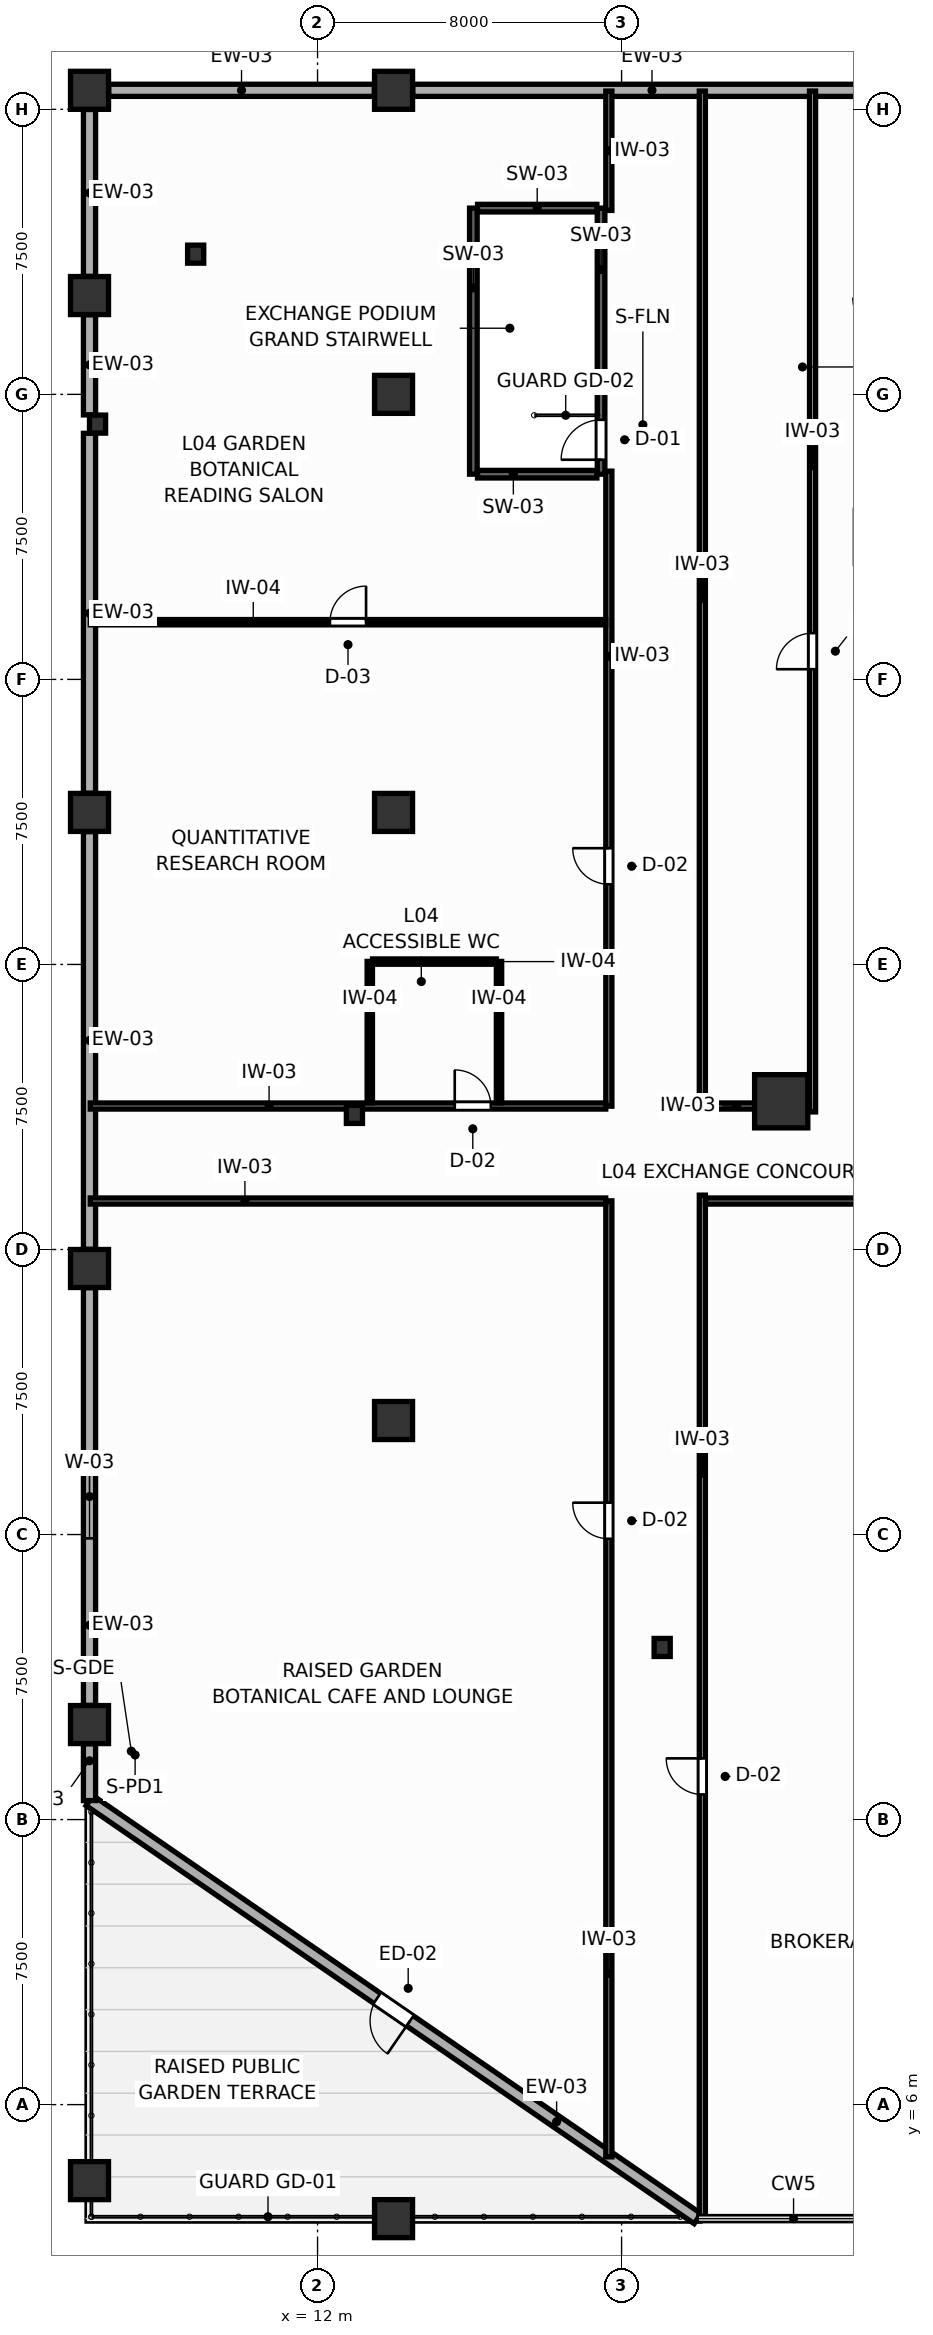
"""IFC4 building model, lengths in metres.
Left out: names, types, materials, properties, quantities, classifications, styles, units other than length and angle.
Written with IfcOpenShell. Run it as: python <this file> out.ifc"""

import sys

from ifc_helpers import new_model, si_unit, direction, frame, frame_2d, origin, origin_2d, place, context, subcontext, project, spatial, rectangle, i_section, extrude, source, transform, mapped, element, fill, save


model = new_model("IFC4")
c1 = context("Model", 3, precision=1e-05, world=origin(), true_north=direction((0.0, 1.0)))
c2 = subcontext(c1, "Body", "Model", "MODEL_VIEW")
j1 = project(units=[si_unit("LENGTHUNIT", "METRE"), si_unit("PLANEANGLEUNIT", "RADIAN")], contexts=[c1])
p1 = place(None, origin())
s1 = spatial("IfcSite", under=j1, at=p1, CompositionType="ELEMENT")
p2 = place(p1, origin())
s2 = spatial("IfcBuilding", under=s1, at=p2, CompositionType="ELEMENT")
p3 = place(p2, frame((0.0, 0.0, 19.2)))
s3 = spatial("IfcBuildingStorey", under=s2, at=p3, CompositionType="ELEMENT", Elevation=19.2)
m1 = source(origin(), c2, "Body", "SweptSolid", [
    extrude(rectangle(XDim=1.4, YDim=1.4, at=origin_2d()), origin(), (0.0, 0.0, 1.0), 4.8),
])
p4 = place(p3, frame((24.2, 32.4, 0.0), z_axis=(0.0, 0.0, 1.0), x_axis=(1.0, 0.0, 0.0)))
e1 = element("IfcColumn", 1, at=p4, inside=s3, PredefinedType="COLUMN", context=c2, shape_type="MappedRepresentation", body=[
    mapped(m1, transform((0.0, 0.0, 0.0), scale=1.0)),
])
m2 = source(origin(), c2, "Body", "SweptSolid", [
    extrude(rectangle(XDim=1.0, YDim=1.0, at=origin_2d()), origin(), (0.0, 0.0, 1.0), 4.8),
])
for number, where, z_axis, x_axis in (
    (2, (6.0, 4.0, 0.0), (0.0, 0.0, 1.0), (1.0, 0.0, 0.0)),
    (3, (6.0, 16.0, 0.0), (0.0, 0.0, 1.0), (1.0, 0.0, 0.0)),
    (4, (6.0, 28.0, 0.0), (0.0, 0.0, 1.0), (1.0, 0.0, 0.0)),
    (5, (6.0, 40.0, 0.0), (0.0, 0.0, 1.0), (1.0, 0.0, 0.0)),
    (6, (6.0, 53.6, 0.0), (0.0, 0.0, 1.0), (1.0, 0.0, 0.0)),
    (7, (6.0, 59.0, 0.0), (0.0, 0.0, 1.0), (1.0, 0.0, 0.0)),
    (8, (14.0, 3.0, 0.0), (0.0, 0.0, 1.0), (1.0, 0.0, 0.0)),
    (9, (14.0, 59.0, 0.0), (0.0, 0.0, 1.0), (1.0, 0.0, 0.0)),
    (10, (14.0, 24.0, 0.0), (0.0, 0.0, 1.0), (1.0, 0.0, 0.0)),
    (11, (14.0, 40.0, 0.0), (0.0, 0.0, 1.0), (1.0, 0.0, 0.0)),
    (12, (14.0, 51.0, 0.0), (0.0, 0.0, 1.0), (1.0, 0.0, 0.0)),
):
    element("IfcColumn", number, at=place(p3, frame(where, z_axis=z_axis, x_axis=x_axis)), inside=s3, PredefinedType="COLUMN", context=c2, shape_type="MappedRepresentation", body=[
        mapped(m2, transform((0.0, 0.0, 0.0), scale=1.0)),
    ])
m3 = source(origin(), c2, "Body", "SweptSolid", [
    extrude(i_section(OverallWidth=0.424, OverallDepth=0.474, WebThickness=0.045, FlangeThickness=0.072, FilletRadius=0.015, at=origin_2d()), origin(), (0.0, 0.0, 1.0), 4.8),
])
for number, where, z_axis, x_axis in (
    (13, (8.793, 54.689, 0.0), (0.0, 0.0, 1.0), (1.0, 0.0, 0.0)),
    (14, (6.211, 50.217, 0.0), (0.0, 0.0, 1.0), (1.0, 0.0, 0.0)),
    (15, (12.97, 32.054, 0.0), (0.0, 0.0, 1.0), (1.0, 0.0, 0.0)),
    (16, (21.068, 18.029, 0.0), (0.0, 0.0, 1.0), (1.0, 0.0, 0.0)),
):
    element("IfcColumn", number, at=place(p3, frame(where, z_axis=z_axis, x_axis=x_axis)), inside=s3, PredefinedType="COLUMN", context=c2, shape_type="MappedRepresentation", body=[
        mapped(m3, transform((0.0, 0.0, 0.0), scale=1.0)),
    ])
p5 = place(p3, frame((6.0, 14.0, 0.0), z_axis=(0.0, 0.0, 1.0), x_axis=(0.824041924199, -0.566528822887, 0.0)))
e17 = element("IfcWall", 17, at=p5, inside=s3, PredefinedType="SOLIDWALL", context=c2, shape_type="SweptSolid", body=[
    extrude(rectangle(XDim=19.417, YDim=0.32, at=frame_2d((9.708, 0.0))), origin(), (0.0, 0.0, 1.0), 4.58),
])
p6 = place(p5, frame((9.183, 0.0, 0.0)))
e18 = element("IfcOpeningElement", 18, at=p6, cuts=e17, PredefinedType="OPENING", context=c2, shape_type="SweptSolid", body=[
    extrude(rectangle(XDim=1.05, YDim=2.1, at=frame_2d((0.525, 1.05))), frame((0.0, 0.17, 0.0), z_axis=(0.0, -1.0, 0.0), x_axis=(1.0, 0.0, 0.0)), (0.0, 0.0, 1.0), 0.34),
])
p7 = place(p3, frame((27.095, 59.0, 0.0), z_axis=(0.0, 0.0, 1.0), x_axis=(-1.0, 0.0, 0.0)))
e19 = element("IfcWall", 19, at=p7, inside=s3, PredefinedType="SOLIDWALL", context=c2, shape_type="SweptSolid", body=[
    extrude(rectangle(XDim=12.59, YDim=0.32, at=frame_2d((6.295, 0.0))), origin(), (0.0, 0.0, 1.0), 3.88),
])
p8 = place(p3, frame((13.495, 59.0, 0.0), z_axis=(0.0, 0.0, 1.0), x_axis=(-1.0, 0.0, 0.0)))
e20 = element("IfcWall", 20, at=p8, inside=s3, PredefinedType="SOLIDWALL", context=c2, shape_type="SweptSolid", body=[
    extrude(rectangle(XDim=6.99, YDim=0.32, at=frame_2d((3.495, 0.0))), origin(), (0.0, 0.0, 1.0), 3.88),
])
p9 = place(p3, frame((6.0, 58.495, 0.0), z_axis=(0.0, 0.0, 1.0), x_axis=(0.0, -1.0, 0.0)))
e21 = element("IfcWall", 21, at=p9, inside=s3, PredefinedType="SOLIDWALL", context=c2, shape_type="SweptSolid", body=[
    extrude(rectangle(XDim=4.39, YDim=0.32, at=frame_2d((2.195, 0.0))), origin(), (0.0, 0.0, 1.0), 3.88),
])
p10 = place(p3, frame((6.0, 53.095, 0.0), z_axis=(0.0, 0.0, 1.0), x_axis=(0.0, -1.0, 0.0)))
e22 = element("IfcWall", 22, at=p10, inside=s3, PredefinedType="SOLIDWALL", context=c2, shape_type="SweptSolid", body=[
    extrude(rectangle(XDim=2.636, YDim=0.32, at=frame_2d((1.318, 0.0))), origin(), (0.0, 0.0, 1.0), 3.88),
])
p11 = place(p3, frame((6.0, 49.975, 0.0), z_axis=(0.0, 0.0, 1.0), x_axis=(0.0, -1.0, 0.0)))
e23 = element("IfcWall", 23, at=p11, inside=s3, PredefinedType="SOLIDWALL", context=c2, shape_type="SweptSolid", body=[
    extrude(rectangle(XDim=9.47, YDim=0.32, at=frame_2d((4.735, 0.0))), origin(), (0.0, 0.0, 1.0), 3.88),
])
p12 = place(p3, frame((6.0, 39.495, 0.0), z_axis=(0.0, 0.0, 1.0), x_axis=(0.0, -1.0, 0.0)))
e24 = element("IfcWall", 24, at=p12, inside=s3, PredefinedType="SOLIDWALL", context=c2, shape_type="SweptSolid", body=[
    extrude(rectangle(XDim=10.99, YDim=0.32, at=frame_2d((5.495, 0.0))), origin(), (0.0, 0.0, 1.0), 3.88),
])
p13 = place(p3, frame((6.0, 27.495, 0.0), z_axis=(0.0, 0.0, 1.0), x_axis=(0.0, -1.0, 0.0)))
e25 = element("IfcWall", 25, at=p13, inside=s3, PredefinedType="SOLIDWALL", context=c2, shape_type="SweptSolid", body=[
    extrude(rectangle(XDim=10.99, YDim=0.32, at=frame_2d((5.495, 0.0))), origin(), (0.0, 0.0, 1.0), 3.88),
])
p14 = place(p13, frame((4.395, 0.0, 0.75)))
e26 = element("IfcOpeningElement", 26, at=p14, cuts=e25, PredefinedType="OPENING", context=c2, shape_type="SweptSolid", body=[
    extrude(rectangle(XDim=2.2, YDim=2.0, at=frame_2d((1.1, 1.0))), frame((0.0, 0.17, 0.0), z_axis=(0.0, -1.0, 0.0), x_axis=(1.0, 0.0, 0.0)), (0.0, 0.0, 1.0), 0.34),
])
p15 = place(p3, frame((6.0, 15.495, 0.0), z_axis=(0.0, 0.0, 1.0), x_axis=(0.0, -1.0, 0.0)))
e27 = element("IfcWall", 27, at=p15, inside=s3, PredefinedType="SOLIDWALL", context=c2, shape_type="SweptSolid", body=[
    extrude(rectangle(XDim=1.495, YDim=0.32, at=frame_2d((0.748, 0.0))), origin(), (0.0, 0.0, 1.0), 3.88),
])
p16 = place(p3, frame((19.46, 48.9, 0.0), z_axis=(0.0, 0.0, 1.0), x_axis=(0.0, 1.0, 0.0)))
e28 = element("IfcWall", 28, at=p16, inside=s3, PredefinedType="SHEAR", context=c2, shape_type="SweptSolid", body=[
    extrude(rectangle(XDim=7.0, YDim=0.2, at=frame_2d((3.5, 0.0))), origin(), (0.0, 0.0, 1.0), 4.8),
])
p17 = place(p16, frame((0.38, 0.0, 0.0)))
e29 = element("IfcOpeningElement", 29, at=p17, cuts=e28, PredefinedType="OPENING", context=c2, shape_type="SweptSolid", body=[
    extrude(rectangle(XDim=1.05, YDim=2.1, at=frame_2d((0.525, 1.05))), frame((0.0, 0.11, 0.0), z_axis=(0.0, -1.0, 0.0), x_axis=(1.0, 0.0, 0.0)), (0.0, 0.0, 1.0), 0.22),
])
p18 = place(p3, frame((16.1, 48.9, 0.0), z_axis=(0.0, 0.0, 1.0), x_axis=(0.0, 1.0, 0.0)))
e30 = element("IfcWall", 30, at=p18, inside=s3, PredefinedType="SHEAR", context=c2, shape_type="SweptSolid", body=[
    extrude(rectangle(XDim=7.0, YDim=0.2, at=frame_2d((3.5, 0.0))), origin(), (0.0, 0.0, 1.0), 4.8),
])
for number, where, z_axis, x_axis in (
    (31, (16.21, 55.9, 0.0), (0.0, 0.0, 1.0), (1.0, 0.0, 0.0)),
    (32, (16.21, 48.9, 0.0), (0.0, 0.0, 1.0), (1.0, 0.0, 0.0)),
):
    element("IfcWall", number, at=place(p3, frame(where, z_axis=z_axis, x_axis=x_axis)), inside=s3, PredefinedType="SHEAR", context=c2, shape_type="SweptSolid", body=[
        extrude(rectangle(XDim=3.14, YDim=0.2, at=frame_2d((1.57, 0.0))), origin(), (0.0, 0.0, 1.0), 4.8),
    ])
p19 = place(p3, frame((22.125, 3.02, 0.0), z_axis=(0.0, 0.0, 1.0), x_axis=(9.072517e-06, 0.999999999959, 0.0)))
e33 = element("IfcWall", 33, at=p19, inside=s3, PredefinedType="PARTITIONING", context=c2, shape_type="SweptSolid", body=[
    extrude(rectangle(XDim=26.91, YDim=0.16, at=frame_2d((13.455, 0.0))), origin(), (0.0, 0.0, 1.0), 4.58),
])
p20 = place(p19, frame((11.14, 0.0, 0.0)))
e34 = element("IfcOpeningElement", 34, at=p20, cuts=e33, PredefinedType="OPENING", context=c2, shape_type="SweptSolid", body=[
    extrude(rectangle(XDim=0.95, YDim=2.05, at=frame_2d((0.475, 1.025))), frame((0.0, 0.09, 0.0), z_axis=(0.0, -1.0, 0.0), x_axis=(1.0, 0.0, 0.0)), (0.0, 0.0, 1.0), 0.18),
])
p21 = place(p3, frame((25.025, 32.12, 0.0), z_axis=(0.0, 0.0, 1.0), x_axis=(0.0, 1.0, 0.0)))
e35 = element("IfcWall", 35, at=p21, inside=s3, PredefinedType="PARTITIONING", context=c2, shape_type="SweptSolid", body=[
    extrude(rectangle(XDim=26.86, YDim=0.16, at=frame_2d((13.43, 0.0))), origin(), (0.0, 0.0, 1.0), 4.58),
])
p22 = place(p21, frame((11.648, 0.0, 0.0)))
e36 = element("IfcOpeningElement", 36, at=p22, cuts=e35, PredefinedType="OPENING", context=c2, shape_type="SweptSolid", body=[
    extrude(rectangle(XDim=0.95, YDim=2.05, at=frame_2d((0.475, 1.025))), frame((0.0, 0.09, 0.0), z_axis=(0.0, -1.0, 0.0), x_axis=(1.0, 0.0, 0.0)), (0.0, 0.0, 1.0), 0.18),
])
p23 = place(p3, frame((22.125, 32.27, 0.0), z_axis=(0.0, 0.0, 1.0), x_axis=(0.0, 1.0, 0.0)))
e37 = element("IfcWall", 37, at=p23, inside=s3, PredefinedType="PARTITIONING", context=c2, shape_type="SweptSolid", body=[
    extrude(rectangle(XDim=26.71, YDim=0.16, at=frame_2d((13.355, 0.0))), origin(), (0.0, 0.0, 1.0), 4.58),
])
p24 = place(p3, frame((19.665, 4.625, 0.0), z_axis=(0.0, 0.0, 1.0), x_axis=(0.0, 1.0, 0.0)))
e38 = element("IfcWall", 38, at=p24, inside=s3, PredefinedType="PARTITIONING", context=c2, shape_type="SweptSolid", body=[
    extrude(rectangle(XDim=25.155, YDim=0.16, at=frame_2d((12.577, 0.0))), origin(), (0.0, 0.0, 1.0), 4.58),
])
p25 = place(p24, frame((16.263, 0.0, 0.0)))
e39 = element("IfcOpeningElement", 39, at=p25, cuts=e38, PredefinedType="OPENING", context=c2, shape_type="SweptSolid", body=[
    extrude(rectangle(XDim=0.95, YDim=2.05, at=frame_2d((0.475, 1.025))), frame((0.0, 0.09, 0.0), z_axis=(0.0, -1.0, 0.0), x_axis=(1.0, 0.0, 0.0)), (0.0, 0.0, 1.0), 0.18),
])
p26 = place(p3, frame((19.665, 32.27, 0.0), z_axis=(0.0, 0.0, 1.0), x_axis=(0.0, 1.0, 0.0)))
e40 = element("IfcWall", 40, at=p26, inside=s3, PredefinedType="PARTITIONING", context=c2, shape_type="SweptSolid", body=[
    extrude(rectangle(XDim=16.71, YDim=0.16, at=frame_2d((8.355, 0.0))), origin(), (0.0, 0.0, 1.0), 4.58),
])
p27 = place(p26, frame((5.839, 0.0, 0.0)))
e41 = element("IfcOpeningElement", 41, at=p27, cuts=e40, PredefinedType="OPENING", context=c2, shape_type="SweptSolid", body=[
    extrude(rectangle(XDim=0.95, YDim=2.05, at=frame_2d((0.475, 1.025))), frame((0.0, 0.09, 0.0), z_axis=(0.0, -1.0, 0.0), x_axis=(1.0, 0.0, 0.0)), (0.0, 0.0, 1.0), 0.18),
])
p28 = place(p3, frame((6.02, 32.275, 0.0), z_axis=(0.0, 0.0, 1.0), x_axis=(1.0, 0.0, 0.0)))
e42 = element("IfcWall", 42, at=p28, inside=s3, PredefinedType="PARTITIONING", context=c2, shape_type="SweptSolid", body=[
    extrude(rectangle(XDim=13.563, YDim=0.16, at=frame_2d((6.781, 0.0))), origin(), (0.0, 0.0, 1.0), 3.88),
])
p29 = place(p28, frame((9.59, 0.0, 0.0)))
e43 = element("IfcOpeningElement", 43, at=p29, cuts=e42, PredefinedType="OPENING", context=c2, shape_type="SweptSolid", body=[
    extrude(rectangle(XDim=0.95, YDim=2.05, at=frame_2d((0.475, 1.025))), frame((0.0, 0.09, 0.0), z_axis=(0.0, -1.0, 0.0), x_axis=(1.0, 0.0, 0.0)), (0.0, 0.0, 1.0), 0.18),
])
p30 = place(p3, frame((6.02, 29.775, 0.0), z_axis=(0.0, 0.0, 1.0), x_axis=(1.0, 0.0, 0.0)))
e44 = element("IfcWall", 44, at=p30, inside=s3, PredefinedType="PARTITIONING", context=c2, shape_type="SweptSolid", body=[
    extrude(rectangle(XDim=13.563, YDim=0.16, at=frame_2d((6.781, 0.0))), origin(), (0.0, 0.0, 1.0), 4.58),
])
p31 = place(p3, frame((22.207, 29.775, 0.0), z_axis=(0.0, 0.0, 1.0), x_axis=(1.0, 0.0, 0.0)))
e45 = element("IfcWall", 45, at=p31, inside=s3, PredefinedType="PARTITIONING", context=c2, shape_type="SweptSolid", body=[
    extrude(rectangle(XDim=12.436, YDim=0.16, at=frame_2d((6.218, 0.0))), origin(), (0.0, 0.0, 1.0), 4.58),
])
p32 = place(p3, frame((19.665, 55.84, 0.0), z_axis=(0.0, 0.0, 1.0), x_axis=(0.0, 1.0, 0.0)))
e46 = element("IfcWall", 46, at=p32, inside=s3, PredefinedType="PARTITIONING", context=c2, shape_type="SweptSolid", body=[
    extrude(rectangle(XDim=3.14, YDim=0.16, at=frame_2d((1.57, 0.0))), origin(), (0.0, 0.0, 1.0), 4.58),
])
p33 = place(p3, frame((22.207, 32.275, 0.0), z_axis=(0.0, 0.0, 1.0), x_axis=(1.0, 0.0, 0.0)))
e47 = element("IfcWall", 47, at=p33, inside=s3, PredefinedType="PARTITIONING", context=c2, shape_type="SweptSolid", body=[
    extrude(rectangle(XDim=2.736, YDim=0.16, at=frame_2d((1.368, 0.0))), origin(), (0.0, 0.0, 1.0), 3.88),
])
p34 = place(p3, frame((6.02, 45.005, 0.0), z_axis=(0.0, 0.0, 1.0), x_axis=(1.0, 0.0, 0.0)))
e48 = element("IfcWall", 48, at=p34, inside=s3, PredefinedType="PARTITIONING", context=c2, shape_type="SweptSolid", body=[
    extrude(rectangle(XDim=13.563, YDim=0.14, at=frame_2d((6.781, 0.0))), origin(), (0.0, 0.0, 1.0), 4.58),
])
p35 = place(p34, frame((6.306, 0.0, 0.0)))
e49 = element("IfcOpeningElement", 49, at=p35, cuts=e48, PredefinedType="OPENING", context=c2, shape_type="SweptSolid", body=[
    extrude(rectangle(XDim=0.95, YDim=2.05, at=frame_2d((0.475, 1.025))), frame((0.0, 0.08, 0.0), z_axis=(0.0, -1.0, 0.0), x_axis=(1.0, 0.0, 0.0)), (0.0, 0.0, 1.0), 0.16),
])
for number, where, z_axis, x_axis in (
    (50, (13.375, 32.357, 0.0), (0.0, 0.0, 1.0), (0.0, 1.0, 0.0)),
    (51, (16.775, 32.357, 0.0), (0.0, 0.0, 1.0), (0.0, 1.0, 0.0)),
):
    element("IfcWall", number, at=place(p3, frame(where, z_axis=z_axis, x_axis=x_axis)), inside=s3, PredefinedType="PARTITIONING", context=c2, shape_type="SweptSolid", body=[
        extrude(rectangle(XDim=3.723, YDim=0.14, at=frame_2d((1.862, 0.0))), origin(), (0.0, 0.0, 1.0), 4.58),
    ])
p36 = place(p3, frame((13.447, 36.075, 0.0), z_axis=(0.0, 0.0, 1.0), x_axis=(1.0, 0.0, 0.0)))
e52 = element("IfcWall", 52, at=p36, inside=s3, PredefinedType="PARTITIONING", context=c2, shape_type="SweptSolid", body=[
    extrude(rectangle(XDim=3.256, YDim=0.14, at=frame_2d((1.628, 0.0))), origin(), (0.0, 0.0, 1.0), 4.58),
])
p37 = place(p6, frame((1.05, 0.0, 0.0), z_axis=(0.0, 0.0, 1.0), x_axis=(-1.0, 0.0, 0.0)))
e53 = element("IfcDoor", 53, at=p37, inside=s3, OperationType="SINGLE_SWING_LEFT", PredefinedType="DOOR", context=c2, shape_type="SweptSolid", body=[
    extrude(rectangle(XDim=1.05, YDim=2.1, at=frame_2d((0.525, 1.05))), frame((0.0, 0.025, 0.0), z_axis=(0.0, -1.0, 0.0), x_axis=(1.0, 0.0, 0.0)), (0.0, 0.0, 1.0), 0.05),
])
fill(e18, e53)
p38 = place(p14, origin())
e54 = element("IfcWindow", 54, at=p38, inside=s3, PartitioningType="SINGLE_PANEL", PredefinedType="WINDOW", context=c2, shape_type="SweptSolid", body=[
    extrude(rectangle(XDim=2.2, YDim=2.0, at=frame_2d((1.1, 1.0))), frame((0.0, 0.03, 0.0), z_axis=(0.0, -1.0, 0.0), x_axis=(1.0, 0.0, 0.0)), (0.0, 0.0, 1.0), 0.06),
])
fill(e26, e54)
p39 = place(p17, origin())
e55 = element("IfcDoor", 55, at=p39, inside=s3, OperationType="SINGLE_SWING_LEFT", PredefinedType="DOOR", context=c2, shape_type="SweptSolid", body=[
    extrude(rectangle(XDim=1.05, YDim=2.1, at=frame_2d((0.525, 1.05))), frame((0.0, 0.025, 0.0), z_axis=(0.0, -1.0, 0.0), x_axis=(1.0, 0.0, 0.0)), (0.0, 0.0, 1.0), 0.05),
])
fill(e29, e55)
p40 = place(p20, origin())
e56 = element("IfcDoor", 56, at=p40, inside=s3, OperationType="SINGLE_SWING_RIGHT", PredefinedType="DOOR", context=c2, shape_type="SweptSolid", body=[
    extrude(rectangle(XDim=0.95, YDim=2.05, at=frame_2d((0.475, 1.025))), frame((0.0, 0.025, 0.0), z_axis=(0.0, -1.0, 0.0), x_axis=(1.0, 0.0, 0.0)), (0.0, 0.0, 1.0), 0.05),
])
fill(e34, e56)
p41 = place(p22, origin())
e57 = element("IfcDoor", 57, at=p41, inside=s3, OperationType="SINGLE_SWING_LEFT", PredefinedType="DOOR", context=c2, shape_type="SweptSolid", body=[
    extrude(rectangle(XDim=0.95, YDim=2.05, at=frame_2d((0.475, 1.025))), frame((0.0, 0.025, 0.0), z_axis=(0.0, -1.0, 0.0), x_axis=(1.0, 0.0, 0.0)), (0.0, 0.0, 1.0), 0.05),
])
fill(e36, e57)
p42 = place(p25, origin())
e58 = element("IfcDoor", 58, at=p42, inside=s3, OperationType="SINGLE_SWING_RIGHT", PredefinedType="DOOR", context=c2, shape_type="SweptSolid", body=[
    extrude(rectangle(XDim=0.95, YDim=2.05, at=frame_2d((0.475, 1.025))), frame((0.0, 0.025, 0.0), z_axis=(0.0, -1.0, 0.0), x_axis=(1.0, 0.0, 0.0)), (0.0, 0.0, 1.0), 0.05),
])
fill(e39, e58)
p43 = place(p27, origin())
e59 = element("IfcDoor", 59, at=p43, inside=s3, OperationType="SINGLE_SWING_RIGHT", PredefinedType="DOOR", context=c2, shape_type="SweptSolid", body=[
    extrude(rectangle(XDim=0.95, YDim=2.05, at=frame_2d((0.475, 1.025))), frame((0.0, 0.025, 0.0), z_axis=(0.0, -1.0, 0.0), x_axis=(1.0, 0.0, 0.0)), (0.0, 0.0, 1.0), 0.05),
])
fill(e41, e59)
p44 = place(p29, origin())
e60 = element("IfcDoor", 60, at=p44, inside=s3, OperationType="SINGLE_SWING_LEFT", PredefinedType="DOOR", context=c2, shape_type="SweptSolid", body=[
    extrude(rectangle(XDim=0.95, YDim=2.05, at=frame_2d((0.475, 1.025))), frame((0.0, 0.025, 0.0), z_axis=(0.0, -1.0, 0.0), x_axis=(1.0, 0.0, 0.0)), (0.0, 0.0, 1.0), 0.05),
])
fill(e43, e60)
p45 = place(p35, origin())
e61 = element("IfcDoor", 61, at=p45, inside=s3, OperationType="SINGLE_SWING_RIGHT", PredefinedType="DOOR", context=c2, shape_type="SweptSolid", body=[
    extrude(rectangle(XDim=0.95, YDim=2.05, at=frame_2d((0.475, 1.025))), frame((0.0, 0.025, 0.0), z_axis=(0.0, -1.0, 0.0), x_axis=(1.0, 0.0, 0.0)), (0.0, 0.0, 1.0), 0.05),
])
fill(e49, e61)
save(model, sys.argv[1])
